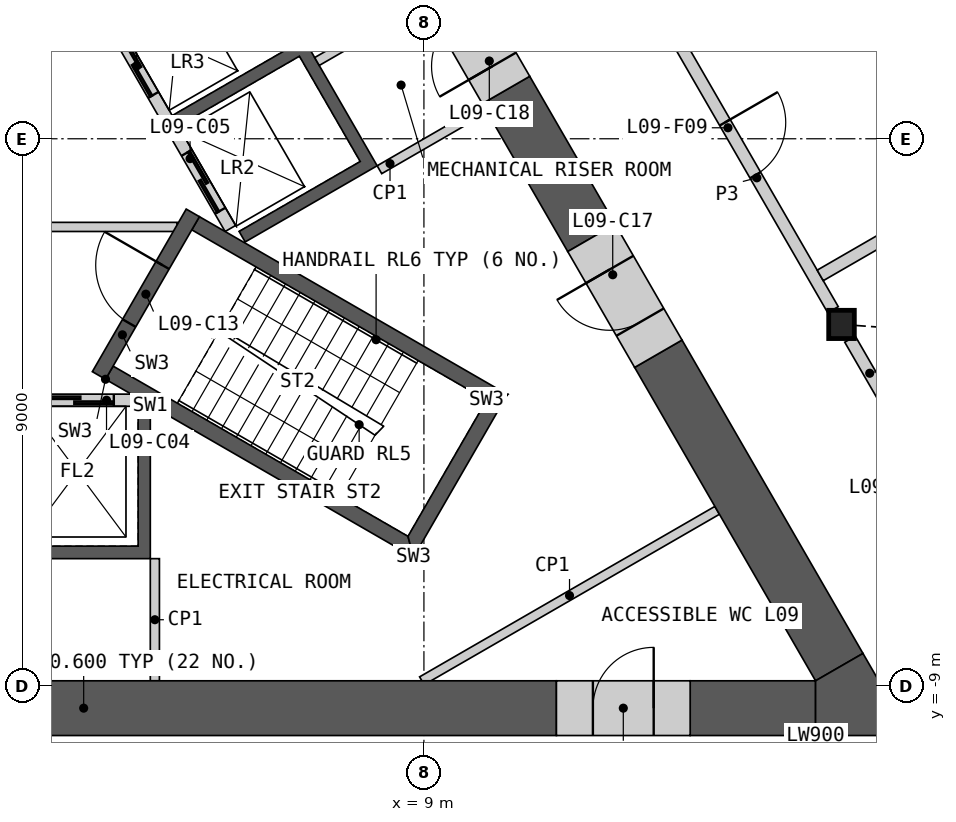
"""IFC4 building model, lengths in metres.
Left out: names, types, materials, properties, quantities, classifications, styles, units other than length and angle.
Written with IfcOpenShell. Run it as: python <this file> out.ifc"""

import sys

from ifc_helpers import new_model, si_unit, direction, frame, frame_2d, origin, origin_2d, place, context, subcontext, project, spatial, polyline, rectangle, i_section, outline, extrude, element, fill, save


model = new_model("IFC4")
c1 = context("Model", 3, precision=1e-05, world=origin(), true_north=direction((0.0, 1.0)))
c2 = subcontext(c1, "Body", "Model", "MODEL_VIEW")
j1 = project(units=[si_unit("LENGTHUNIT", "METRE"), si_unit("PLANEANGLEUNIT", "RADIAN")], contexts=[c1])
p1 = place(None, origin())
s1 = spatial("IfcSite", under=j1, at=p1, CompositionType="ELEMENT")
p2 = place(p1, origin())
s2 = spatial("IfcBuilding", under=s1, at=p2, CompositionType="ELEMENT")
p3 = place(p2, frame((0.0, 0.0, 46.8)))
s3 = spatial("IfcBuildingStorey", under=s2, at=p3, CompositionType="ELEMENT", Elevation=46.8)
p4 = place(p3, frame((15.868, -3.054, 0.0), z_axis=(0.0, 0.0, 1.0), x_axis=(1.0, 0.0, 0.0)))
e1 = element("IfcColumn", 1, at=p4, inside=s3, PredefinedType="COLUMN", context=c2, shape_type="SweptSolid", body=[
    extrude(i_section(OverallWidth=0.421, OverallDepth=0.465, WebThickness=0.045, FlangeThickness=0.072, at=origin_2d()), origin(), (0.0, 0.0, 1.0), 4.2),
])
p5 = place(p3, origin())
e2 = element("IfcWall", 2, at=p5, inside=s3, PredefinedType="SHEAR", context=c2, shape_type="SweptSolid", body=[
    extrude(outline(polyline([(4.5, -4.4), (4.5, -6.906), (-4.5, -6.906), (-4.5, -4.4), (-4.3, -4.4), (-4.3, -6.7), (-2.3, -6.7), (-2.3, -4.4), (-2.1, -4.4), (-2.1, -6.7), (-0.1, -6.7), (-0.1, -4.4), (0.1, -4.4), (0.1, -6.7), (2.1, -6.7), (2.1, -4.4), (2.3, -4.4), (2.3, -6.7), (4.3, -6.7), (4.3, -4.4), (4.5, -4.4)])), origin(), (0.0, 0.0, 1.0), 3.8),
])
p6 = place(p3, frame((-4.187, -4.3, 0.0), z_axis=(0.0, 0.0, 1.0), x_axis=(1.0, 0.0, 0.0)))
e3 = element("IfcWall", 3, at=p6, inside=s3, PredefinedType="SOLIDWALL", context=c2, shape_type="SweptSolid", body=[
    extrude(rectangle(XDim=8.373, YDim=0.2, at=frame_2d((4.187, 0.0))), origin(), (0.0, 0.0, 1.0), 3.8),
])
p7 = place(p6, frame((0.287, 0.0, 0.0)))
e4 = element("IfcOpeningElement", 4, at=p7, cuts=e3, PredefinedType="OPENING", context=c2, shape_type="SweptSolid", body=[
    extrude(rectangle(XDim=1.2, YDim=2.1, at=frame_2d((0.6, 1.05))), frame((0.0, 0.11, 0.0), z_axis=(0.0, -1.0, 0.0), x_axis=(1.0, 0.0, 0.0)), (0.0, 0.0, 1.0), 0.22),
])
p8 = place(p6, frame((2.387, 0.0, 0.0)))
e5 = element("IfcOpeningElement", 5, at=p8, cuts=e3, PredefinedType="OPENING", context=c2, shape_type="SweptSolid", body=[
    extrude(rectangle(XDim=1.4, YDim=2.1, at=frame_2d((0.7, 1.05))), frame((0.0, 0.11, 0.0), z_axis=(0.0, -1.0, 0.0), x_axis=(1.0, 0.0, 0.0)), (0.0, 0.0, 1.0), 0.22),
])
p9 = place(p6, frame((4.737, 0.0, 0.0)))
e6 = element("IfcOpeningElement", 6, at=p9, cuts=e3, PredefinedType="OPENING", context=c2, shape_type="SweptSolid", body=[
    extrude(rectangle(XDim=1.1, YDim=2.1, at=frame_2d((0.55, 1.05))), frame((0.0, 0.11, 0.0), z_axis=(0.0, -1.0, 0.0), x_axis=(1.0, 0.0, 0.0)), (0.0, 0.0, 1.0), 0.22),
])
p10 = place(p6, frame((6.887, 0.0, 0.0)))
e7 = element("IfcOpeningElement", 7, at=p10, cuts=e3, PredefinedType="OPENING", context=c2, shape_type="SweptSolid", body=[
    extrude(rectangle(XDim=1.2, YDim=2.1, at=frame_2d((0.6, 1.05))), frame((0.0, 0.11, 0.0), z_axis=(0.0, -1.0, 0.0), x_axis=(1.0, 0.0, 0.0)), (0.0, 0.0, 1.0), 0.22),
])
p11 = place(p3, origin())
e8 = element("IfcWall", 8, at=p11, inside=s3, PredefinedType="SHEAR", context=c2, shape_type="SweptSolid", body=[
    extrude(outline(polyline([(2.66, 4.192), (4.831, 5.445), (8.231, -0.444), (6.061, -1.697), (5.96, -1.524), (7.952, -0.374), (6.952, 1.358), (4.96, 0.208), (4.861, 0.381), (6.852, 1.531), (5.852, 3.263), (3.861, 2.113), (3.76, 2.287), (5.752, 3.437), (4.752, 5.169), (2.76, 4.019), (2.66, 4.192)])), origin(), (0.0, 0.0, 1.0), 3.8),
])
p12 = place(p3, frame((5.817, -1.476, 0.0), z_axis=(0.0, 0.0, 1.0), x_axis=(-0.500002616675, 0.866023893041, 0.0)))
e9 = element("IfcWall", 9, at=p12, inside=s3, PredefinedType="SOLIDWALL", context=c2, shape_type="SweptSolid", body=[
    extrude(rectangle(XDim=8.373, YDim=0.2, at=frame_2d((4.187, 0.0))), origin(), (0.0, 0.0, 1.0), 3.8),
])
p13 = place(p12, frame((0.337, 0.0, 0.0)))
e10 = element("IfcOpeningElement", 10, at=p13, cuts=e9, PredefinedType="OPENING", context=c2, shape_type="SweptSolid", body=[
    extrude(rectangle(XDim=1.1, YDim=2.1, at=frame_2d((0.55, 1.05))), frame((0.0, 0.11, 0.0), z_axis=(0.0, -1.0, 0.0), x_axis=(1.0, 0.0, 0.0)), (0.0, 0.0, 1.0), 0.22),
])
p14 = place(p12, frame((2.537, 0.0, 0.0)))
e11 = element("IfcOpeningElement", 11, at=p14, cuts=e9, PredefinedType="OPENING", context=c2, shape_type="SweptSolid", body=[
    extrude(rectangle(XDim=1.1, YDim=2.1, at=frame_2d((0.55, 1.05))), frame((0.0, 0.11, 0.0), z_axis=(0.0, -1.0, 0.0), x_axis=(1.0, 0.0, 0.0)), (0.0, 0.0, 1.0), 0.22),
])
p15 = place(p12, frame((4.737, 0.0, 0.0)))
e12 = element("IfcOpeningElement", 12, at=p15, cuts=e9, PredefinedType="OPENING", context=c2, shape_type="SweptSolid", body=[
    extrude(rectangle(XDim=1.1, YDim=2.1, at=frame_2d((0.55, 1.05))), frame((0.0, 0.11, 0.0), z_axis=(0.0, -1.0, 0.0), x_axis=(1.0, 0.0, 0.0)), (0.0, 0.0, 1.0), 0.22),
])
p16 = place(p12, frame((7.037, 0.0, 0.0)))
e13 = element("IfcOpeningElement", 13, at=p16, cuts=e9, PredefinedType="OPENING", context=c2, shape_type="SweptSolid", body=[
    extrude(rectangle(XDim=0.9, YDim=2.1, at=frame_2d((0.45, 1.05))), frame((0.0, 0.11, 0.0), z_axis=(0.0, -1.0, 0.0), x_axis=(1.0, 0.0, 0.0)), (0.0, 0.0, 1.0), 0.22),
])
p17 = place(p3, frame((-4.941, -1.45, 0.0), z_axis=(0.0, 0.0, 1.0), x_axis=(1.0, 0.0, 0.0)))
e14 = element("IfcWall", 14, at=p17, inside=s3, PredefinedType="PARTITIONING", context=c2, shape_type="SweptSolid", body=[
    extrude(rectangle(XDim=9.882, YDim=0.15, at=frame_2d((4.941, 0.0))), origin(), (0.0, 0.0, 1.0), 3.8),
])
p18 = place(p17, frame((4.391, 0.0, 0.0)))
e15 = element("IfcOpeningElement", 15, at=p18, cuts=e14, PredefinedType="OPENING", context=c2, shape_type="SweptSolid", body=[
    extrude(rectangle(XDim=1.1, YDim=2.1, at=frame_2d((0.55, 1.05))), frame((0.0, 0.085, 0.0), z_axis=(0.0, -1.0, 0.0), x_axis=(1.0, 0.0, 0.0)), (0.0, 0.0, 1.0), 0.17),
])
p19 = place(p3, origin())
e16 = element("IfcWall", 16, at=p19, inside=s3, PredefinedType="SHEAR", context=c2, shape_type="SweptSolid", body=[
    extrude(outline(polyline([(3.763, -3.956), (8.83, -6.881), (8.738, -6.539), (3.888, -3.739), (3.763, -3.956)])), origin(), (0.0, 0.0, 1.0), 3.8),
])
p20 = place(p3, origin())
e17 = element("IfcWall", 17, at=p20, inside=s3, PredefinedType="SHEAR", context=c2, shape_type="SweptSolid", body=[
    extrude(outline(polyline([(8.83, -6.881), (10.374, -4.206), (10.032, -4.298), (8.738, -6.539), (8.83, -6.881)])), origin(), (0.0, 0.0, 1.0), 3.8),
])
p21 = place(p3, origin())
e18 = element("IfcWall", 18, at=p21, inside=s3, PredefinedType="SHEAR", context=c2, shape_type="SweptSolid", body=[
    extrude(outline(polyline([(10.032, -4.298), (10.374, -4.206), (5.307, -1.281), (5.182, -1.498), (10.032, -4.298)])), origin(), (0.0, 0.0, 1.0), 3.8),
])
p22 = place(p3, frame((3.655, -3.893, 0.0), z_axis=(0.0, 0.0, 1.0), x_axis=(0.499982516597, 0.866035497597, 0.0)))
e19 = element("IfcWall", 19, at=p22, inside=s3, PredefinedType="SHEAR", context=c2, shape_type="SweptSolid", body=[
    extrude(rectangle(XDim=3.088, YDim=0.25, at=frame_2d((1.544, 0.0))), origin(), (0.0, 0.0, 1.0), 3.8),
])
p23 = place(p22, frame((0.994, 0.0, 0.0)))
e20 = element("IfcOpeningElement", 20, at=p23, cuts=e19, PredefinedType="OPENING", context=c2, shape_type="SweptSolid", body=[
    extrude(rectangle(XDim=1.1, YDim=2.1, at=frame_2d((0.55, 1.05))), frame((0.0, 0.135, 0.0), z_axis=(0.0, -1.0, 0.0), x_axis=(1.0, 0.0, 0.0)), (0.0, 0.0, 1.0), 0.27),
])
p24 = place(p3, frame((4.575, -6.906, 0.0), z_axis=(0.0, 0.0, 1.0), x_axis=(0.0, -1.0, 0.0)))
e21 = element("IfcWall", 21, at=p24, inside=s3, PredefinedType="PARTITIONING", context=c2, shape_type="SweptSolid", body=[
    extrude(rectangle(XDim=2.009, YDim=0.15, at=frame_2d((1.004, 0.0))), origin(), (0.0, 0.0, 1.0), 3.8),
])
p25 = place(p3, frame((8.268, -0.509, 0.0), z_axis=(0.0, 0.0, 1.0), x_axis=(0.866035824272, 0.499981950752, 0.0)))
e22 = element("IfcWall", 22, at=p25, inside=s3, PredefinedType="PARTITIONING", context=c2, shape_type="SweptSolid", body=[
    extrude(rectangle(XDim=2.009, YDim=0.15, at=frame_2d((1.004, 0.0))), origin(), (0.0, 0.0, 1.0), 3.8),
])
p26 = place(p3, frame((13.823, -6.111, 0.0), z_axis=(0.0, 0.0, 1.0), x_axis=(-0.866026802741, -0.499997576928, 0.0)))
e23 = element("IfcWall", 23, at=p26, inside=s3, PredefinedType="PARTITIONING", context=c2, shape_type="SweptSolid", body=[
    extrude(rectangle(XDim=5.607, YDim=0.15, at=frame_2d((2.804, 0.0))), origin(), (0.0, 0.0, 1.0), 3.8),
])
p27 = place(p3, frame((8.981, 2.275, 0.0), z_axis=(0.0, 0.0, 1.0), x_axis=(-0.866013584312, -0.500020471368, 0.0)))
e24 = element("IfcWall", 24, at=p27, inside=s3, PredefinedType="PARTITIONING", context=c2, shape_type="SweptSolid", body=[
    extrude(rectangle(XDim=2.009, YDim=0.15, at=frame_2d((1.005, 0.0))), origin(), (0.0, 0.0, 1.0), 3.8),
])
p28 = place(p3, frame((-4.371, -9.365, 0.0), z_axis=(0.0, 0.0, 1.0), x_axis=(1.0, 0.0, 0.0)))
e25 = element("IfcWall", 25, at=p28, inside=s3, PredefinedType="SHEAR", context=c2, shape_type="SweptSolid", body=[
    extrude(rectangle(XDim=15.55, YDim=0.9, at=frame_2d((7.775, 0.0))), origin(), (0.0, 0.0, 1.0), 3.8),
])
p29 = place(p3, frame((13.379, -9.365, 0.0), z_axis=(0.0, 0.0, 1.0), x_axis=(1.0, 0.0, 0.0)))
e26 = element("IfcWall", 26, at=p29, inside=s3, PredefinedType="SHEAR", context=c2, shape_type="SweptSolid", body=[
    extrude(rectangle(XDim=2.062, YDim=0.9, at=frame_2d((1.031, 0.0))), origin(), (0.0, 0.0, 1.0), 3.8),
])
p30 = place(p3, frame((15.831, -8.69, 0.0), z_axis=(0.0, 0.0, 1.0), x_axis=(-0.499999419053, 0.866025739194, 0.0)))
e27 = element("IfcWall", 27, at=p30, inside=s3, PredefinedType="SHEAR", context=c2, shape_type="SweptSolid", body=[
    extrude(rectangle(XDim=5.952, YDim=0.9, at=frame_2d((2.976, 0.0))), origin(), (0.0, 0.0, 1.0), 3.8),
])
p31 = place(p3, frame((11.755, -1.63, 0.0), z_axis=(0.0, 0.0, 1.0), x_axis=(-0.499943114462, 0.866058244174, 0.0)))
e28 = element("IfcWall", 28, at=p31, inside=s3, PredefinedType="SHEAR", context=c2, shape_type="SweptSolid", body=[
    extrude(rectangle(XDim=2.809, YDim=0.9, at=frame_2d((1.405, 0.0))), origin(), (0.0, 0.0, 1.0), 3.8),
])
p32 = place(p3, origin())
e29 = element("IfcWall", 29, at=p32, inside=s3, PredefinedType="SHEAR", context=c2, shape_type="SweptSolid", body=[
    extrude(outline(polyline([(15.441, -9.815), (15.441, -8.915), (16.221, -8.465), (17.0, -9.815), (15.441, -9.815)])), origin(), (0.0, 0.0, 1.0), 3.8),
])
p33 = place(p3, frame((11.179, -9.365, 0.0), z_axis=(0.0, 0.0, 1.0), x_axis=(1.0, 0.0, 0.0)))
e30 = element("IfcWall", 30, at=p33, inside=s3, PredefinedType="SHEAR", context=c2, shape_type="SweptSolid", body=[
    extrude(rectangle(XDim=2.2, YDim=0.9, at=frame_2d((1.1, 0.0))), origin(), (0.0, 0.0, 1.0), 3.8),
])
p34 = place(p33, frame((0.6, 0.0, 0.0)))
e31 = element("IfcOpeningElement", 31, at=p34, cuts=e30, PredefinedType="OPENING", context=c2, shape_type="SweptSolid", body=[
    extrude(rectangle(XDim=1.0, YDim=2.1, at=frame_2d((0.5, 1.05))), frame((0.0, 0.46, 0.0), z_axis=(0.0, -1.0, 0.0), x_axis=(1.0, 0.0, 0.0)), (0.0, 0.0, 1.0), 0.92),
])
p35 = place(p3, frame((12.855, -3.536, 0.0), z_axis=(0.0, 0.0, 1.0), x_axis=(-0.50002983664, 0.866008176907, 0.0)))
e32 = element("IfcWall", 32, at=p35, inside=s3, PredefinedType="SHEAR", context=c2, shape_type="SweptSolid", body=[
    extrude(rectangle(XDim=2.2, YDim=0.9, at=frame_2d((1.1, 0.0))), origin(), (0.0, 0.0, 1.0), 3.8),
])
p36 = place(p35, frame((0.6, 0.0, 0.0)))
e33 = element("IfcOpeningElement", 33, at=p36, cuts=e32, PredefinedType="OPENING", context=c2, shape_type="SweptSolid", body=[
    extrude(rectangle(XDim=1.0, YDim=2.1, at=frame_2d((0.5, 1.05))), frame((0.0, 0.46, 0.0), z_axis=(0.0, -1.0, 0.0), x_axis=(1.0, 0.0, 0.0)), (0.0, 0.0, 1.0), 0.92),
])
p37 = place(p3, frame((10.35, 0.803, 0.0), z_axis=(0.0, 0.0, 1.0), x_axis=(-0.500081290722, 0.865978465477, 0.0)))
e34 = element("IfcWall", 34, at=p37, inside=s3, PredefinedType="SHEAR", context=c2, shape_type="SweptSolid", body=[
    extrude(rectangle(XDim=1.865, YDim=0.9, at=frame_2d((0.933, 0.0))), origin(), (0.0, 0.0, 1.0), 3.8),
])
p38 = place(p37, frame((0.45, 0.0, 0.0)))
e35 = element("IfcOpeningElement", 35, at=p38, cuts=e34, PredefinedType="OPENING", context=c2, shape_type="SweptSolid", body=[
    extrude(rectangle(XDim=1.0, YDim=2.1, at=frame_2d((0.5, 1.05))), frame((0.0, 0.46, 0.0), z_axis=(0.0, -1.0, 0.0), x_axis=(1.0, 0.0, 0.0)), (0.0, 0.0, 1.0), 0.92),
])
p39 = place(p3, frame((10.719, 5.865, 0.0), z_axis=(0.0, 0.0, 1.0), x_axis=(0.49999175339, -0.866030164915, 0.0)))
e36 = element("IfcWall", 36, at=p39, inside=s3, PredefinedType="PARTITIONING", context=c2, shape_type="SweptSolid", body=[
    extrude(rectangle(XDim=10.019, YDim=0.2, at=frame_2d((5.009, 0.0))), origin(), (0.0, 0.0, 1.0), 3.8),
])
p40 = place(p39, frame((6.464, 0.0, 0.0)))
e37 = element("IfcOpeningElement", 37, at=p40, cuts=e36, PredefinedType="OPENING", context=c2, shape_type="SweptSolid", body=[
    extrude(rectangle(XDim=1.0, YDim=2.1, at=frame_2d((0.5, 1.05))), frame((0.0, 0.11, 0.0), z_axis=(0.0, -1.0, 0.0), x_axis=(1.0, 0.0, 0.0)), (0.0, 0.0, 1.0), 0.22),
])
p41 = place(p39, frame((1.753, 0.0, 0.0)))
e38 = element("IfcOpeningElement", 38, at=p41, cuts=e36, PredefinedType="OPENING", context=c2, shape_type="SweptSolid", body=[
    extrude(rectangle(XDim=1.0, YDim=2.1, at=frame_2d((0.5, 1.05))), frame((0.0, 0.11, 0.0), z_axis=(0.0, -1.0, 0.0), x_axis=(1.0, 0.0, 0.0)), (0.0, 0.0, 1.0), 0.22),
])
p42 = place(p3, frame((16.008, -3.296, 0.0), z_axis=(0.0, 0.0, 1.0), x_axis=(0.499984737558, -0.86603421538, 0.0)))
e39 = element("IfcWall", 39, at=p42, inside=s3, PredefinedType="PARTITIONING", context=c2, shape_type="SweptSolid", body=[
    extrude(rectangle(XDim=6.473, YDim=0.2, at=frame_2d((3.236, 0.0))), origin(), (0.0, 0.0, 1.0), 3.8),
])
p43 = place(p42, frame((4.512, 0.0, 0.0)))
e40 = element("IfcOpeningElement", 40, at=p43, cuts=e39, PredefinedType="OPENING", context=c2, shape_type="SweptSolid", body=[
    extrude(rectangle(XDim=1.0, YDim=2.1, at=frame_2d((0.5, 1.05))), frame((0.0, 0.11, 0.0), z_axis=(0.0, -1.0, 0.0), x_axis=(1.0, 0.0, 0.0)), (0.0, 0.0, 1.0), 0.22),
])
p44 = place(p42, frame((1.366, 0.0, 0.0)))
e41 = element("IfcOpeningElement", 41, at=p44, cuts=e39, PredefinedType="OPENING", context=c2, shape_type="SweptSolid", body=[
    extrude(rectangle(XDim=1.0, YDim=2.1, at=frame_2d((0.5, 1.05))), frame((0.0, 0.11, 0.0), z_axis=(0.0, -1.0, 0.0), x_axis=(1.0, 0.0, 0.0)), (0.0, 0.0, 1.0), 0.22),
])
p45 = place(p3, frame((15.518, -2.248, 0.0), z_axis=(0.0, 0.0, 1.0), x_axis=(0.866025231175, 0.500000298968, 0.0)))
e42 = element("IfcWall", 42, at=p45, inside=s3, PredefinedType="PARTITIONING", context=c2, shape_type="SweptSolid", body=[
    extrude(rectangle(XDim=13.159, YDim=0.2, at=frame_2d((6.579, 0.0))), origin(), (0.0, 0.0, 1.0), 2.885),
])
p46 = place(p10, origin())
e43 = element("IfcDoor", 43, at=p46, inside=s3, OperationType="SLIDING_TO_LEFT", PredefinedType="DOOR", context=c2, shape_type="SweptSolid", body=[
    extrude(rectangle(XDim=1.2, YDim=2.1, at=frame_2d((0.6, 1.05))), frame((0.0, 0.025, 0.0), z_axis=(0.0, -1.0, 0.0), x_axis=(1.0, 0.0, 0.0)), (0.0, 0.0, 1.0), 0.05),
])
fill(e7, e43)
p47 = place(p13, origin())
e44 = element("IfcDoor", 44, at=p47, inside=s3, OperationType="SLIDING_TO_LEFT", PredefinedType="DOOR", context=c2, shape_type="SweptSolid", body=[
    extrude(rectangle(XDim=1.1, YDim=2.1, at=frame_2d((0.55, 1.05))), frame((0.0, 0.025, 0.0), z_axis=(0.0, -1.0, 0.0), x_axis=(1.0, 0.0, 0.0)), (0.0, 0.0, 1.0), 0.05),
])
fill(e10, e44)
p48 = place(p14, origin())
e45 = element("IfcDoor", 45, at=p48, inside=s3, OperationType="SLIDING_TO_LEFT", PredefinedType="DOOR", context=c2, shape_type="SweptSolid", body=[
    extrude(rectangle(XDim=1.1, YDim=2.1, at=frame_2d((0.55, 1.05))), frame((0.0, 0.025, 0.0), z_axis=(0.0, -1.0, 0.0), x_axis=(1.0, 0.0, 0.0)), (0.0, 0.0, 1.0), 0.05),
])
fill(e11, e45)
p49 = place(p23, origin())
e46 = element("IfcDoor", 46, at=p49, inside=s3, OperationType="SINGLE_SWING_RIGHT", PredefinedType="DOOR", context=c2, shape_type="SweptSolid", body=[
    extrude(rectangle(XDim=1.1, YDim=2.1, at=frame_2d((0.55, 1.05))), frame((0.0, 0.025, 0.0), z_axis=(0.0, -1.0, 0.0), x_axis=(1.0, 0.0, 0.0)), (0.0, 0.0, 1.0), 0.05),
])
fill(e20, e46)
p50 = place(p34, origin())
e47 = element("IfcDoor", 47, at=p50, inside=s3, OperationType="SINGLE_SWING_RIGHT", PredefinedType="DOOR", context=c2, shape_type="SweptSolid", body=[
    extrude(rectangle(XDim=1.0, YDim=2.1, at=frame_2d((0.5, 1.05))), frame((0.0, 0.205, 0.0), z_axis=(0.0, -1.0, 0.0), x_axis=(1.0, 0.0, 0.0)), (0.0, 0.0, 1.0), 0.05),
])
fill(e31, e47)
p51 = place(p36, origin())
e48 = element("IfcDoor", 48, at=p51, inside=s3, OperationType="SINGLE_SWING_RIGHT", PredefinedType="DOOR", context=c2, shape_type="SweptSolid", body=[
    extrude(rectangle(XDim=1.0, YDim=2.1, at=frame_2d((0.5, 1.05))), frame((0.0, 0.205, 0.0), z_axis=(0.0, -1.0, 0.0), x_axis=(1.0, 0.0, 0.0)), (0.0, 0.0, 1.0), 0.05),
])
fill(e33, e48)
p52 = place(p38, origin())
e49 = element("IfcDoor", 49, at=p52, inside=s3, OperationType="SINGLE_SWING_LEFT", PredefinedType="DOOR", context=c2, shape_type="SweptSolid", body=[
    extrude(rectangle(XDim=1.0, YDim=2.1, at=frame_2d((0.5, 1.05))), frame((0.0, 0.205, 0.0), z_axis=(0.0, -1.0, 0.0), x_axis=(1.0, 0.0, 0.0)), (0.0, 0.0, 1.0), 0.05),
])
fill(e35, e49)
p53 = place(p40, origin())
e50 = element("IfcDoor", 50, at=p53, inside=s3, OperationType="SINGLE_SWING_LEFT", PredefinedType="DOOR", context=c2, shape_type="SweptSolid", body=[
    extrude(rectangle(XDim=1.0, YDim=2.1, at=frame_2d((0.5, 1.05))), frame((0.0, 0.025, 0.0), z_axis=(0.0, -1.0, 0.0), x_axis=(1.0, 0.0, 0.0)), (0.0, 0.0, 1.0), 0.05),
])
fill(e37, e50)
save(model, sys.argv[1])
